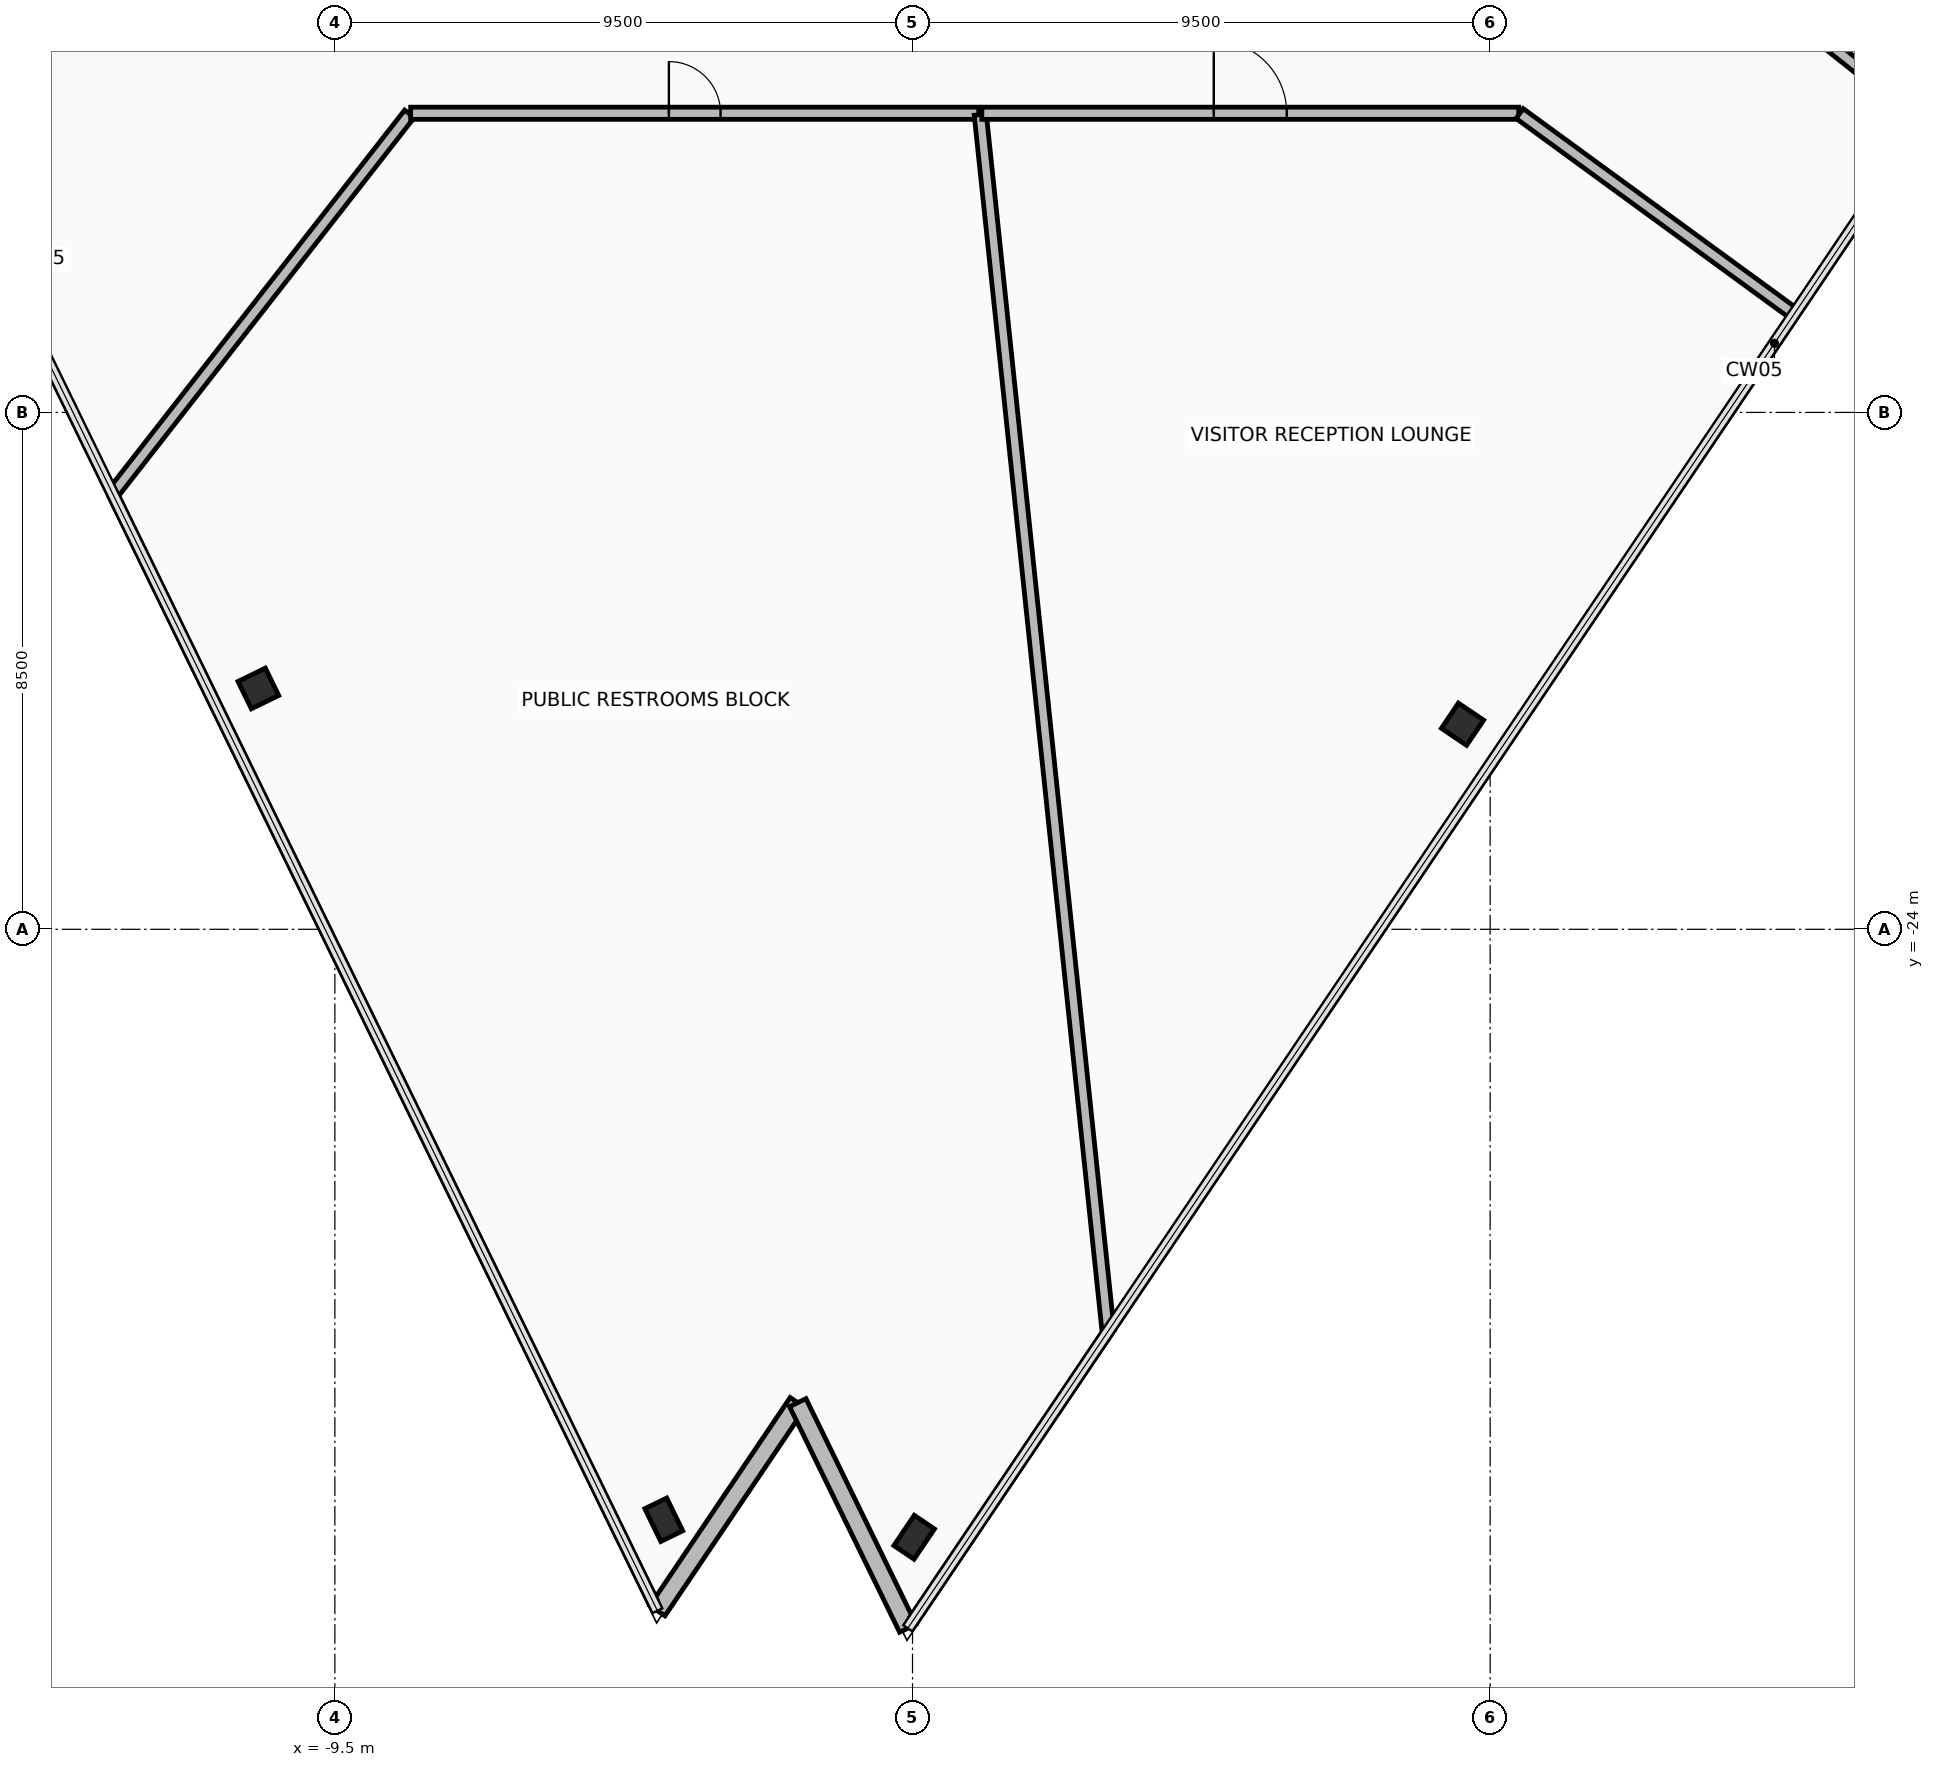
"""IFC4 building model, lengths in metres.
Left out: names, types, materials, properties, quantities, classifications, styles, units other than length and angle.
Written with IfcOpenShell. Run it as: python <this file> out.ifc"""

import sys

from ifc_helpers import new_model, si_unit, direction, frame, frame_2d, origin, origin_2d, place, context, subcontext, project, spatial, rectangle, hollow_rectangle, extrude, element, fill, save


model = new_model("IFC4")
c1 = context("Model", 3, precision=1e-05, world=origin(), true_north=direction((0.0, 1.0)))
c2 = subcontext(c1, "Body", "Model", "MODEL_VIEW")
j1 = project(units=[si_unit("LENGTHUNIT", "METRE"), si_unit("PLANEANGLEUNIT", "RADIAN")], contexts=[c1])
p1 = place(None, origin())
s1 = spatial("IfcSite", under=j1, at=p1, CompositionType="ELEMENT")
p2 = place(p1, origin())
s2 = spatial("IfcBuilding", under=s1, at=p2, CompositionType="ELEMENT")
p3 = place(p2, frame((0.0, 0.0, 245.05)))
s3 = spatial("IfcBuildingStorey", under=s2, at=p3, CompositionType="ELEMENT", Elevation=245.05)
p4 = place(p3, frame((-10.758, -20.039, 0.0), z_axis=(0.0, 0.0, 1.0), x_axis=(-0.438371146789, 0.898794046299, 0.0)))
e1 = element("IfcColumn", 1, at=p4, inside=s3, PredefinedType="COLUMN", context=c2, shape_type="SweptSolid", body=[
    extrude(hollow_rectangle(XDim=0.5, YDim=0.5, WallThickness=0.032, at=origin_2d()), origin(), (0.0, 0.0, 1.0), 3.6),
])
for number, where, z_axis, x_axis in (
    (2, (-4.091, -33.71, 0.0), (0.0, 0.0, 1.0), (-0.438, 0.899, 0.0)),
    (3, (0.027, -33.998, 0.0), (0.0, 0.0, 1.0), (0.559, 0.829, 0.0)),
):
    element("IfcColumn", number, at=place(p3, frame(where, z_axis=z_axis, x_axis=x_axis)), inside=s3, PredefinedType="COLUMN", context=c2, shape_type="SweptSolid", body=[
        extrude(hollow_rectangle(XDim=0.4, YDim=0.6, WallThickness=0.03, at=origin_2d()), origin(), (0.0, 0.0, 1.0), 3.6),
    ])
p5 = place(p3, frame((9.046, -20.628, 0.0), z_axis=(0.0, 0.0, 1.0), x_axis=(0.559194350413, 0.829036596578, 0.0)))
e4 = element("IfcColumn", 4, at=p5, inside=s3, PredefinedType="COLUMN", context=c2, shape_type="SweptSolid", body=[
    extrude(hollow_rectangle(XDim=0.5, YDim=0.5, WallThickness=0.032, at=origin_2d()), origin(), (0.0, 0.0, 1.0), 3.6),
])
p6 = place(p3, frame((-4.195, -35.207, 0.0), z_axis=(0.0, 0.0, 1.0), x_axis=(0.559182319101, 0.829044711704, 0.0)))
e5 = element("IfcWall", 5, at=p6, inside=s3, PredefinedType="STANDARD", context=c2, shape_type="SweptSolid", body=[
    extrude(rectangle(XDim=4.128, YDim=0.3, at=frame_2d((2.064, 0.0))), origin(), (0.0, 0.0, 1.0), 2.765),
])
p7 = place(p3, frame((-1.887, -31.784, 0.0), z_axis=(0.0, 0.0, 1.0), x_axis=(0.438367699713, -0.898795727542, 0.0)))
e6 = element("IfcWall", 6, at=p7, inside=s3, PredefinedType="STANDARD", context=c2, shape_type="SweptSolid", body=[
    extrude(rectangle(XDim=4.128, YDim=0.3, at=frame_2d((2.064, 0.0))), origin(), (0.0, 0.0, 1.0), 2.765),
])
p8 = place(p3, frame((-4.274, -35.046, 0.0), z_axis=(0.0, 0.0, 1.0), x_axis=(-0.438373256784, 0.898793017183, 0.0)))
e7 = element("IfcWall", 7, at=p8, inside=s3, PredefinedType="PARTITIONING", context=c2, shape_type="SweptSolid", body=[
    extrude(rectangle(XDim=20.243, YDim=0.15, at=frame_2d((10.122, 0.0))), origin(), (0.0, 0.0, 1.0), 3.42),
])
p9 = place(p3, frame((-13.145, -16.825, 0.0), z_axis=(0.0, 0.0, 1.0), x_axis=(0.615675775654, 0.787999580757, 0.0)))
e8 = element("IfcWall", 8, at=p9, inside=s3, PredefinedType="PARTITIONING", context=c2, shape_type="SweptSolid", body=[
    extrude(rectangle(XDim=7.913, YDim=0.2, at=frame_2d((3.956, 0.0))), origin(), (0.0, 0.0, 1.0), 2.765),
])
p10 = place(p3, frame((-8.254, -10.58, 0.0), z_axis=(0.0, 0.0, 1.0), x_axis=(1.0, 0.0, 0.0)))
e9 = element("IfcWall", 9, at=p10, inside=s3, PredefinedType="PARTITIONING", context=c2, shape_type="SweptSolid", body=[
    extrude(rectangle(XDim=9.344, YDim=0.2, at=frame_2d((4.672, 0.0))), origin(), (0.0, 0.0, 1.0), 2.915),
])
p11 = place(p10, frame((4.247, 0.0, 0.0)))
e10 = element("IfcOpeningElement", 10, at=p11, cuts=e9, PredefinedType="OPENING", context=c2, shape_type="SweptSolid", body=[
    extrude(rectangle(XDim=0.85, YDim=2.1, at=frame_2d((0.425, 1.05))), frame((0.0, 0.11, 0.0), z_axis=(0.0, -1.0, 0.0), x_axis=(1.0, 0.0, 0.0)), (0.0, 0.0, 1.0), 0.22),
])
p12 = place(p3, frame((1.115, -10.602, 0.0), z_axis=(0.0, 0.0, 1.0), x_axis=(0.104521097019, -0.994522669565, 0.0)))
e11 = element("IfcWall", 11, at=p12, inside=s3, PredefinedType="PARTITIONING", context=c2, shape_type="SweptSolid", body=[
    extrude(rectangle(XDim=20.109, YDim=0.2, at=frame_2d((10.054, 0.0))), origin(), (0.0, 0.0, 1.0), 2.765),
])
p13 = place(p3, frame((3.212, -30.618, 0.0), z_axis=(0.0, 0.0, 1.0), x_axis=(-0.559216250121, -0.829021824563, 0.0)))
e12 = element("IfcWall", 12, at=p13, inside=s3, PredefinedType="PARTITIONING", context=c2, shape_type="SweptSolid", body=[
    extrude(rectangle(XDim=5.703, YDim=0.15, at=frame_2d((2.852, 0.0))), origin(), (0.0, 0.0, 1.0), 3.42),
])
p14 = place(p3, frame((-11.889, -6.911, 0.0), z_axis=(0.0, 0.0, 1.0), x_axis=(-0.782362036509, -0.622823926828, 0.0)))
e13 = element("IfcWall", 13, at=p14, inside=s3, PredefinedType="PARTITIONING", context=c2, shape_type="SweptSolid", body=[
    extrude(rectangle(XDim=5.622, YDim=0.2, at=frame_2d((2.811, 0.0))), origin(), (0.0, 0.0, 1.0), 2.765),
])
p15 = place(p14, frame((2.311, 0.0, 0.0)))
e14 = element("IfcOpeningElement", 14, at=p15, cuts=e13, PredefinedType="OPENING", context=c2, shape_type="SweptSolid", body=[
    extrude(rectangle(XDim=1.0, YDim=2.15, at=frame_2d((0.5, 1.075))), frame((0.0, 0.11, 0.0), z_axis=(0.0, -1.0, 0.0), x_axis=(1.0, 0.0, 0.0)), (0.0, 0.0, 1.0), 0.22),
])
p16 = place(p3, frame((1.14, -10.58, 0.0), z_axis=(0.0, 0.0, 1.0), x_axis=(1.0, 0.0, 0.0)))
e15 = element("IfcWall", 15, at=p16, inside=s3, PredefinedType="PARTITIONING", context=c2, shape_type="SweptSolid", body=[
    extrude(rectangle(XDim=8.83, YDim=0.2, at=frame_2d((4.415, 0.0))), origin(), (0.0, 0.0, 1.0), 2.915),
])
p17 = place(p16, frame((3.815, 0.0, 0.0)))
e16 = element("IfcOpeningElement", 16, at=p17, cuts=e15, PredefinedType="OPENING", context=c2, shape_type="SweptSolid", body=[
    extrude(rectangle(XDim=1.2, YDim=2.15, at=frame_2d((0.6, 1.075))), frame((0.0, 0.11, 0.0), z_axis=(0.0, -1.0, 0.0), x_axis=(1.0, 0.0, 0.0)), (0.0, 0.0, 1.0), 0.22),
])
p18 = place(p3, frame((9.985, -10.585, 0.0), z_axis=(0.0, 0.0, 1.0), x_axis=(0.807826909807, -0.589419785714, 0.0)))
e17 = element("IfcWall", 17, at=p18, inside=s3, PredefinedType="PARTITIONING", context=c2, shape_type="SweptSolid", body=[
    extrude(rectangle(XDim=5.591, YDim=0.2, at=frame_2d((2.796, 0.0))), origin(), (0.0, 0.0, 1.0), 2.765),
])
p19 = place(p3, frame((16.648, -10.698, 0.0), z_axis=(0.0, 0.0, 1.0), x_axis=(-0.782393880824, 0.622783923402, 0.0)))
e18 = element("IfcWall", 18, at=p19, inside=s3, PredefinedType="PARTITIONING", context=c2, shape_type="SweptSolid", body=[
    extrude(rectangle(XDim=6.082, YDim=0.2, at=frame_2d((3.041, 0.0))), origin(), (0.0, 0.0, 1.0), 2.765),
])
p20 = place(p11, origin())
e19 = element("IfcDoor", 19, at=p20, inside=s3, OperationType="SINGLE_SWING_RIGHT", PredefinedType="DOOR", context=c2, shape_type="SweptSolid", body=[
    extrude(rectangle(XDim=0.85, YDim=2.1, at=frame_2d((0.425, 1.05))), frame((0.0, 0.025, 0.0), z_axis=(0.0, -1.0, 0.0), x_axis=(1.0, 0.0, 0.0)), (0.0, 0.0, 1.0), 0.05),
])
fill(e10, e19)
p21 = place(p17, origin())
e20 = element("IfcDoor", 20, at=p21, inside=s3, OperationType="SINGLE_SWING_LEFT", PredefinedType="DOOR", context=c2, shape_type="SweptSolid", body=[
    extrude(rectangle(XDim=1.2, YDim=2.15, at=frame_2d((0.6, 1.075))), frame((0.0, 0.025, 0.0), z_axis=(0.0, -1.0, 0.0), x_axis=(1.0, 0.0, 0.0)), (0.0, 0.0, 1.0), 0.05),
])
fill(e16, e20)
save(model, sys.argv[1])
